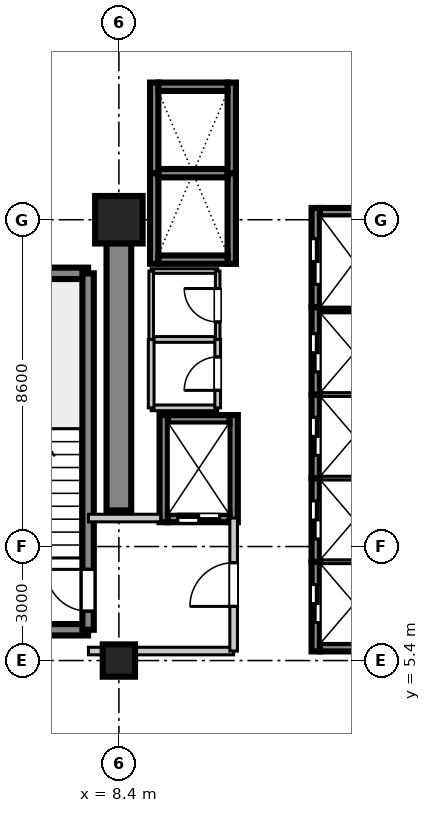
"""IFC4 building model, lengths in metres.
Left out: names, types, materials, properties, quantities, classifications, styles, units other than length and angle.
Written with IfcOpenShell. Run it as: python <this file> out.ifc"""

import sys

from ifc_helpers import new_model, si_unit, direction, frame, frame_2d, origin, origin_2d, place, context, subcontext, project, spatial, rectangle, extrude, source, transform, mapped, element, fill, save


model = new_model("IFC4")
c1 = context("Model", 3, precision=1e-05, world=origin(), true_north=direction((0.0, 1.0)))
c2 = subcontext(c1, "Body", "Model", "MODEL_VIEW")
j1 = project(units=[si_unit("LENGTHUNIT", "METRE"), si_unit("PLANEANGLEUNIT", "RADIAN")], contexts=[c1])
p1 = place(None, origin())
s1 = spatial("IfcSite", under=j1, at=p1, CompositionType="ELEMENT")
p2 = place(p1, origin())
s2 = spatial("IfcBuilding", under=s1, at=p2, CompositionType="ELEMENT")
p3 = place(p2, frame((0.0, 0.0, 95.6)))
s3 = spatial("IfcBuildingStorey", under=s2, at=p3, CompositionType="ELEMENT", Elevation=95.6)
m1 = source(origin(), c2, "Body", "SweptSolid", [
    extrude(rectangle(XDim=0.85, YDim=0.85, at=origin_2d()), origin(), (0.0, 0.0, 1.0), 3.605),
])
p4 = place(p3, frame((8.4, 5.4, 0.0), z_axis=(0.0, 0.0, 1.0), x_axis=(1.0, 0.0, 0.0)))
e1 = element("IfcColumn", 1, at=p4, inside=s3, PredefinedType="PILASTER", context=c2, shape_type="MappedRepresentation", body=[
    mapped(m1, transform((0.0, 0.0, 0.0), scale=1.0)),
])
m2 = source(origin(), c2, "Body", "SweptSolid", [
    extrude(rectangle(XDim=1.25, YDim=1.25, at=origin_2d()), origin(), (0.0, 0.0, 1.0), 3.605),
])
p5 = place(p3, frame((8.4, 17.0, 0.0), z_axis=(0.0, 0.0, 1.0), x_axis=(1.0, 0.0, 0.0)))
e2 = element("IfcColumn", 2, at=p5, inside=s3, PredefinedType="COLUMN", context=c2, shape_type="MappedRepresentation", body=[
    mapped(m2, transform((0.0, 0.0, 0.0), scale=1.0)),
])
m3 = source(origin(), c2, "Body", "SweptSolid", [
    extrude(rectangle(XDim=7.65, YDim=0.65, at=frame_2d((3.825, 0.0))), origin(), (0.0, 0.0, 1.0), 3.38),
])
p6 = place(p3, frame((8.4, 9.35, 0.0), z_axis=(0.0, 0.0, 1.0), x_axis=(0.0, 1.0, 0.0)))
e3 = element("IfcWall", 3, at=p6, inside=s3, PredefinedType="SHEAR", context=c2, shape_type="MappedRepresentation", body=[
    mapped(m3, transform((0.0, 0.0, 0.0), scale=1.0)),
])
m4 = source(origin(), c2, "Body", "SweptSolid", [
    extrude(rectangle(XDim=3.98, YDim=0.3, at=frame_2d((1.99, 0.0))), origin(), (0.0, 0.0, 1.0), 3.38),
])
for number, where, z_axis, x_axis in (
    (4, (3.61, 6.21, 0.0), (0.0, 0.0, 1.0), (1.0, 0.0, 0.0)),
    (5, (3.61, 15.59, 0.0), (0.0, 0.0, 1.0), (1.0, 0.0, 0.0)),
):
    element("IfcWall", number, at=place(p3, frame(where, z_axis=z_axis, x_axis=x_axis)), inside=s3, PredefinedType="SHEAR", context=c2, shape_type="MappedRepresentation", body=[
        mapped(m4, transform((0.0, 0.0, 0.0), scale=1.0)),
    ])
m5 = source(origin(), c2, "Body", "SweptSolid", [
    extrude(rectangle(XDim=9.38, YDim=0.3, at=frame_2d((4.69, 0.0))), origin(), (0.0, 0.0, 1.0), 3.38),
])
p7 = place(p3, frame((7.59, 6.21, 0.0), z_axis=(0.0, 0.0, 1.0), x_axis=(0.0, 1.0, 0.0)))
e6 = element("IfcWall", 6, at=p7, inside=s3, PredefinedType="SHEAR", context=c2, shape_type="MappedRepresentation", body=[
    mapped(m5, transform((0.0, 0.0, 0.0), scale=1.0)),
])
p8 = place(p7, frame((0.49, 0.0, 0.0)))
e7 = element("IfcOpeningElement", 7, at=p8, cuts=e6, PredefinedType="OPENING", context=c2, shape_type="SweptSolid", body=[
    extrude(rectangle(XDim=1.1, YDim=2.15, at=frame_2d((0.55, 1.075))), frame((0.0, 0.16, 0.0), z_axis=(0.0, -1.0, 0.0), x_axis=(1.0, 0.0, 0.0)), (0.0, 0.0, 1.0), 0.32),
])
m6 = source(origin(), c2, "Body", "SweptSolid", [
    extrude(rectangle(XDim=2.36, YDim=0.22, at=frame_2d((1.18, 0.0))), origin(), (0.0, 0.0, 1.0), 3.38),
])
p9 = place(p3, frame((13.58, 5.64, 0.0), z_axis=(0.0, 0.0, 1.0), x_axis=(0.0, 1.0, 0.0)))
e8 = element("IfcWall", 8, at=p9, inside=s3, PredefinedType="SHEAR", context=c2, shape_type="MappedRepresentation", body=[
    mapped(m6, transform((0.0, 0.0, 0.0), scale=1.0)),
])
p10 = place(p9, frame((0.76, 0.0, 0.0)))
e9 = element("IfcOpeningElement", 9, at=p10, cuts=e8, PredefinedType="OPENING", context=c2, shape_type="SweptSolid", body=[
    extrude(rectangle(XDim=1.0, YDim=2.2, at=frame_2d((0.5, 1.1))), frame((0.0, 0.12, 0.0), z_axis=(0.0, -1.0, 0.0), x_axis=(1.0, 0.0, 0.0)), (0.0, 0.0, 1.0), 0.24),
])
m7 = source(origin(), c2, "Body", "SweptSolid", [
    extrude(rectangle(XDim=1.82, YDim=0.22, at=frame_2d((0.91, 0.0))), origin(), (0.0, 0.0, 1.0), 3.38),
])
p11 = place(p3, frame((13.69, 5.75, 0.0), z_axis=(0.0, 0.0, 1.0), x_axis=(1.0, 0.0, 0.0)))
e10 = element("IfcWall", 10, at=p11, inside=s3, PredefinedType="SHEAR", context=c2, shape_type="MappedRepresentation", body=[
    mapped(m7, transform((0.0, 0.0, 0.0), scale=1.0)),
])
m8 = source(origin(), c2, "Body", "SweptSolid", [
    extrude(rectangle(XDim=1.82, YDim=0.22, at=frame_2d((0.91, 0.0))), origin(), (0.0, 0.0, 1.0), 3.65),
])
p12 = place(p3, frame((13.69, 8.0, 0.0), z_axis=(0.0, 0.0, 1.0), x_axis=(1.0, 0.0, 0.0)))
e11 = element("IfcWall", 11, at=p12, inside=s3, PredefinedType="SHEAR", context=c2, shape_type="MappedRepresentation", body=[
    mapped(m8, transform((0.0, 0.0, 0.0), scale=1.0)),
])
m9 = source(origin(), c2, "Body", "SweptSolid", [
    extrude(rectangle(XDim=2.2, YDim=0.22, at=frame_2d((1.1, 0.0))), origin(), (0.0, 0.0, 1.0), 3.38),
])
p13 = place(p3, frame((13.58, 8.0, 0.0), z_axis=(0.0, 0.0, 1.0), x_axis=(0.0, 1.0, 0.0)))
e12 = element("IfcWall", 12, at=p13, inside=s3, PredefinedType="SHEAR", context=c2, shape_type="MappedRepresentation", body=[
    mapped(m9, transform((0.0, 0.0, 0.0), scale=1.0)),
])
p14 = place(p13, frame((0.6, 0.0, 0.0)))
e13 = element("IfcOpeningElement", 13, at=p14, cuts=e12, PredefinedType="OPENING", context=c2, shape_type="SweptSolid", body=[
    extrude(rectangle(XDim=1.0, YDim=2.2, at=frame_2d((0.5, 1.1))), frame((0.0, 0.12, 0.0), z_axis=(0.0, -1.0, 0.0), x_axis=(1.0, 0.0, 0.0)), (0.0, 0.0, 1.0), 0.24),
])
p15 = place(p3, frame((13.69, 10.2, 0.0), z_axis=(0.0, 0.0, 1.0), x_axis=(1.0, 0.0, 0.0)))
e14 = element("IfcWall", 14, at=p15, inside=s3, PredefinedType="SHEAR", context=c2, shape_type="MappedRepresentation", body=[
    mapped(m8, transform((0.0, 0.0, 0.0), scale=1.0)),
])
p16 = place(p3, frame((13.58, 10.2, 0.0), z_axis=(0.0, 0.0, 1.0), x_axis=(0.0, 1.0, 0.0)))
e15 = element("IfcWall", 15, at=p16, inside=s3, PredefinedType="SHEAR", context=c2, shape_type="MappedRepresentation", body=[
    mapped(m9, transform((0.0, 0.0, 0.0), scale=1.0)),
])
p17 = place(p16, frame((0.6, 0.0, 0.0)))
e16 = element("IfcOpeningElement", 16, at=p17, cuts=e15, PredefinedType="OPENING", context=c2, shape_type="SweptSolid", body=[
    extrude(rectangle(XDim=1.0, YDim=2.2, at=frame_2d((0.5, 1.1))), frame((0.0, 0.12, 0.0), z_axis=(0.0, -1.0, 0.0), x_axis=(1.0, 0.0, 0.0)), (0.0, 0.0, 1.0), 0.24),
])
p18 = place(p3, frame((13.69, 12.4, 0.0), z_axis=(0.0, 0.0, 1.0), x_axis=(1.0, 0.0, 0.0)))
e17 = element("IfcWall", 17, at=p18, inside=s3, PredefinedType="SHEAR", context=c2, shape_type="MappedRepresentation", body=[
    mapped(m8, transform((0.0, 0.0, 0.0), scale=1.0)),
])
m10 = source(origin(), c2, "Body", "SweptSolid", [
    extrude(rectangle(XDim=2.3, YDim=0.22, at=frame_2d((1.15, 0.0))), origin(), (0.0, 0.0, 1.0), 3.38),
])
p19 = place(p3, frame((13.58, 12.4, 0.0), z_axis=(0.0, 0.0, 1.0), x_axis=(0.0, 1.0, 0.0)))
e18 = element("IfcWall", 18, at=p19, inside=s3, PredefinedType="SHEAR", context=c2, shape_type="MappedRepresentation", body=[
    mapped(m10, transform((0.0, 0.0, 0.0), scale=1.0)),
])
p20 = place(p19, frame((0.6, 0.0, 0.0)))
e19 = element("IfcOpeningElement", 19, at=p20, cuts=e18, PredefinedType="OPENING", context=c2, shape_type="SweptSolid", body=[
    extrude(rectangle(XDim=1.0, YDim=2.2, at=frame_2d((0.5, 1.1))), frame((0.0, 0.12, 0.0), z_axis=(0.0, -1.0, 0.0), x_axis=(1.0, 0.0, 0.0)), (0.0, 0.0, 1.0), 0.24),
])
p21 = place(p3, frame((13.69, 14.7, 0.0), z_axis=(0.0, 0.0, 1.0), x_axis=(1.0, 0.0, 0.0)))
e20 = element("IfcWall", 20, at=p21, inside=s3, PredefinedType="SHEAR", context=c2, shape_type="MappedRepresentation", body=[
    mapped(m8, transform((0.0, 0.0, 0.0), scale=1.0)),
])
m11 = source(origin(), c2, "Body", "SweptSolid", [
    extrude(rectangle(XDim=2.385, YDim=0.22, at=frame_2d((1.192, 0.0))), origin(), (0.0, 0.0, 1.0), 3.38),
])
for number, where, z_axis, x_axis in (
    (21, (9.33, 15.84, 0.0), (0.0, 0.0, 1.0), (0.0, 1.0, 0.0)),
    (22, (11.37, 15.84, 0.0), (0.0, 0.0, 1.0), (0.0, 1.0, 0.0)),
):
    element("IfcWall", number, at=place(p3, frame(where, z_axis=z_axis, x_axis=x_axis)), inside=s3, PredefinedType="SHEAR", context=c2, shape_type="MappedRepresentation", body=[
        mapped(m11, transform((0.0, 0.0, 0.0), scale=1.0)),
    ])
p22 = place(p3, frame((9.44, 15.95, 0.0), z_axis=(0.0, 0.0, 1.0), x_axis=(1.0, 0.0, 0.0)))
e23 = element("IfcWall", 23, at=p22, inside=s3, PredefinedType="SHEAR", context=c2, shape_type="MappedRepresentation", body=[
    mapped(m7, transform((0.0, 0.0, 0.0), scale=1.0)),
])
p23 = place(p3, frame((9.44, 18.225, 0.0), z_axis=(0.0, 0.0, 1.0), x_axis=(1.0, 0.0, 0.0)))
e24 = element("IfcWall", 24, at=p23, inside=s3, PredefinedType="SHEAR", context=c2, shape_type="MappedRepresentation", body=[
    mapped(m8, transform((0.0, 0.0, 0.0), scale=1.0)),
])
for number, where, z_axis, x_axis in (
    (25, (9.33, 18.225, 0.0), (0.0, 0.0, 1.0), (0.0, 1.0, 0.0)),
    (26, (11.37, 18.225, 0.0), (0.0, 0.0, 1.0), (0.0, 1.0, 0.0)),
):
    element("IfcWall", number, at=place(p3, frame(where, z_axis=z_axis, x_axis=x_axis)), inside=s3, PredefinedType="SHEAR", context=c2, shape_type="MappedRepresentation", body=[
        mapped(m11, transform((0.0, 0.0, 0.0), scale=1.0)),
    ])
p24 = place(p3, frame((9.44, 20.5, 0.0), z_axis=(0.0, 0.0, 1.0), x_axis=(1.0, 0.0, 0.0)))
e27 = element("IfcWall", 27, at=p24, inside=s3, PredefinedType="SHEAR", context=c2, shape_type="MappedRepresentation", body=[
    mapped(m7, transform((0.0, 0.0, 0.0), scale=1.0)),
])
m12 = source(origin(), c2, "Body", "SweptSolid", [
    extrude(rectangle(XDim=2.82, YDim=0.22, at=frame_2d((1.41, 0.0))), origin(), (0.0, 0.0, 1.0), 3.38),
])
for number, where, z_axis, x_axis in (
    (28, (9.58, 9.04, 0.0), (0.0, 0.0, 1.0), (0.0, 1.0, 0.0)),
    (29, (11.42, 9.04, 0.0), (0.0, 0.0, 1.0), (0.0, 1.0, 0.0)),
):
    element("IfcWall", number, at=place(p3, frame(where, z_axis=z_axis, x_axis=x_axis)), inside=s3, PredefinedType="SHEAR", context=c2, shape_type="MappedRepresentation", body=[
        mapped(m12, transform((0.0, 0.0, 0.0), scale=1.0)),
    ])
m13 = source(origin(), c2, "Body", "SweptSolid", [
    extrude(rectangle(XDim=1.62, YDim=0.22, at=frame_2d((0.81, 0.0))), origin(), (0.0, 0.0, 1.0), 3.38),
])
p25 = place(p3, frame((9.69, 9.15, 0.0), z_axis=(0.0, 0.0, 1.0), x_axis=(1.0, 0.0, 0.0)))
e30 = element("IfcWall", 30, at=p25, inside=s3, PredefinedType="SHEAR", context=c2, shape_type="MappedRepresentation", body=[
    mapped(m13, transform((0.0, 0.0, 0.0), scale=1.0)),
])
p26 = place(p25, frame((0.26, 0.0, 0.0)))
e31 = element("IfcOpeningElement", 31, at=p26, cuts=e30, PredefinedType="OPENING", context=c2, shape_type="SweptSolid", body=[
    extrude(rectangle(XDim=1.1, YDim=2.2, at=frame_2d((0.55, 1.1))), frame((0.0, 0.12, 0.0), z_axis=(0.0, -1.0, 0.0), x_axis=(1.0, 0.0, 0.0)), (0.0, 0.0, 1.0), 0.24),
])
p27 = place(p3, frame((9.69, 11.75, 0.0), z_axis=(0.0, 0.0, 1.0), x_axis=(1.0, 0.0, 0.0)))
e32 = element("IfcWall", 32, at=p27, inside=s3, PredefinedType="SHEAR", context=c2, shape_type="MappedRepresentation", body=[
    mapped(m13, transform((0.0, 0.0, 0.0), scale=1.0)),
])
m14 = source(origin(), c2, "Body", "SweptSolid", [
    extrude(rectangle(XDim=2.61, YDim=0.22, at=frame_2d((1.305, 0.0))), origin(), (0.0, 0.0, 1.0), 3.38),
])
p28 = place(p3, frame((13.58, 14.7, 0.0), z_axis=(0.0, 0.0, 1.0), x_axis=(0.0, 1.0, 0.0)))
e33 = element("IfcWall", 33, at=p28, inside=s3, PredefinedType="SHEAR", context=c2, shape_type="MappedRepresentation", body=[
    mapped(m14, transform((0.0, 0.0, 0.0), scale=1.0)),
])
p29 = place(p28, frame((0.6, 0.0, 0.0)))
e34 = element("IfcOpeningElement", 34, at=p29, cuts=e33, PredefinedType="OPENING", context=c2, shape_type="SweptSolid", body=[
    extrude(rectangle(XDim=1.2, YDim=2.2, at=frame_2d((0.6, 1.1))), frame((0.0, 0.12, 0.0), z_axis=(0.0, -1.0, 0.0), x_axis=(1.0, 0.0, 0.0)), (0.0, 0.0, 1.0), 0.24),
])
p30 = place(p3, frame((13.69, 17.2, 0.0), z_axis=(0.0, 0.0, 1.0), x_axis=(1.0, 0.0, 0.0)))
e35 = element("IfcWall", 35, at=p30, inside=s3, PredefinedType="SHEAR", context=c2, shape_type="MappedRepresentation", body=[
    mapped(m7, transform((0.0, 0.0, 0.0), scale=1.0)),
])
m15 = source(origin(), c2, "Body", "SweptSolid", [
    extrude(rectangle(XDim=3.82, YDim=0.2, at=frame_2d((1.91, 0.0))), origin(), (0.0, 0.0, 1.0), 2.72),
])
p31 = place(p3, frame((7.6, 5.65, 0.0), z_axis=(0.0, 0.0, 1.0), x_axis=(1.0, 0.0, 0.0)))
e36 = element("IfcWall", 36, at=p31, inside=s3, PredefinedType="PARTITIONING", context=c2, shape_type="MappedRepresentation", body=[
    mapped(m15, transform((0.0, 0.0, 0.0), scale=1.0)),
])
m16 = source(origin(), c2, "Body", "SweptSolid", [
    extrude(rectangle(XDim=1.9, YDim=0.2, at=frame_2d((0.95, 0.0))), origin(), (0.0, 0.0, 1.0), 2.72),
])
p32 = place(p3, frame((7.6, 9.15, 0.0), z_axis=(0.0, 0.0, 1.0), x_axis=(1.0, 0.0, 0.0)))
e37 = element("IfcWall", 37, at=p32, inside=s3, PredefinedType="PARTITIONING", context=c2, shape_type="MappedRepresentation", body=[
    mapped(m16, transform((0.0, 0.0, 0.0), scale=1.0)),
])
m17 = source(origin(), c2, "Body", "SweptSolid", [
    extrude(rectangle(XDim=3.5, YDim=0.2, at=frame_2d((1.75, 0.0))), origin(), (0.0, 0.0, 1.0), 2.72),
])
p33 = place(p3, frame((11.42, 5.65, 0.0), z_axis=(0.0, 0.0, 1.0), x_axis=(0.0, 1.0, 0.0)))
e38 = element("IfcWall", 38, at=p33, inside=s3, PredefinedType="PARTITIONING", context=c2, shape_type="MappedRepresentation", body=[
    mapped(m17, transform((0.0, 0.0, 0.0), scale=1.0)),
])
p34 = place(p33, frame((1.175, 0.0, 0.0)))
e39 = element("IfcOpeningElement", 39, at=p34, cuts=e38, PredefinedType="OPENING", context=c2, shape_type="SweptSolid", body=[
    extrude(rectangle(XDim=1.15, YDim=2.15, at=frame_2d((0.575, 1.075))), frame((0.0, 0.11, 0.0), z_axis=(0.0, -1.0, 0.0), x_axis=(1.0, 0.0, 0.0)), (0.0, 0.0, 1.0), 0.22),
])
m18 = source(origin(), c2, "Body", "SweptSolid", [
    extrude(rectangle(XDim=1.75, YDim=0.15, at=frame_2d((0.875, 0.0))), origin(), (0.0, 0.0, 1.0), 2.72),
])
for number, where, z_axis, x_axis in (
    (40, (9.25, 12.05, 0.0), (0.0, 0.0, 1.0), (1.0, 0.0, 0.0)),
    (41, (9.25, 13.85, 0.0), (0.0, 0.0, 1.0), (1.0, 0.0, 0.0)),
):
    element("IfcWall", number, at=place(p3, frame(where, z_axis=z_axis, x_axis=x_axis)), inside=s3, PredefinedType="PARTITIONING", context=c2, shape_type="MappedRepresentation", body=[
        mapped(m18, transform((0.0, 0.0, 0.0), scale=1.0)),
    ])
m19 = source(origin(), c2, "Body", "SweptSolid", [
    extrude(rectangle(XDim=1.8, YDim=0.15, at=frame_2d((0.9, 0.0))), origin(), (0.0, 0.0, 1.0), 2.72),
])
p35 = place(p3, frame((9.25, 12.05, 0.0), z_axis=(0.0, 0.0, 1.0), x_axis=(0.0, 1.0, 0.0)))
e42 = element("IfcWall", 42, at=p35, inside=s3, PredefinedType="PARTITIONING", context=c2, shape_type="MappedRepresentation", body=[
    mapped(m19, transform((0.0, 0.0, 0.0), scale=1.0)),
])
p36 = place(p3, frame((11.0, 12.05, 0.0), z_axis=(0.0, 0.0, 1.0), x_axis=(0.0, 1.0, 0.0)))
e43 = element("IfcWall", 43, at=p36, inside=s3, PredefinedType="PARTITIONING", context=c2, shape_type="MappedRepresentation", body=[
    mapped(m19, transform((0.0, 0.0, 0.0), scale=1.0)),
])
p37 = place(p36, frame((0.46, 0.0, 0.0)))
e44 = element("IfcOpeningElement", 44, at=p37, cuts=e43, PredefinedType="OPENING", context=c2, shape_type="SweptSolid", body=[
    extrude(rectangle(XDim=0.88, YDim=2.1, at=frame_2d((0.44, 1.05))), frame((0.0, 0.085, 0.0), z_axis=(0.0, -1.0, 0.0), x_axis=(1.0, 0.0, 0.0)), (0.0, 0.0, 1.0), 0.17),
])
m20 = source(origin(), c2, "Body", "SweptSolid", [
    extrude(rectangle(XDim=1.75, YDim=0.12, at=frame_2d((0.875, 0.0))), origin(), (0.0, 0.0, 1.0), 2.72),
])
p38 = place(p3, frame((9.25, 15.65, 0.0), z_axis=(0.0, 0.0, 1.0), x_axis=(1.0, 0.0, 0.0)))
e45 = element("IfcWall", 45, at=p38, inside=s3, PredefinedType="PARTITIONING", context=c2, shape_type="MappedRepresentation", body=[
    mapped(m20, transform((0.0, 0.0, 0.0), scale=1.0)),
])
m21 = source(origin(), c2, "Body", "SweptSolid", [
    extrude(rectangle(XDim=1.8, YDim=0.12, at=frame_2d((0.9, 0.0))), origin(), (0.0, 0.0, 1.0), 2.72),
])
p39 = place(p3, frame((9.25, 13.85, 0.0), z_axis=(0.0, 0.0, 1.0), x_axis=(0.0, 1.0, 0.0)))
e46 = element("IfcWall", 46, at=p39, inside=s3, PredefinedType="PARTITIONING", context=c2, shape_type="MappedRepresentation", body=[
    mapped(m21, transform((0.0, 0.0, 0.0), scale=1.0)),
])
p40 = place(p3, frame((11.0, 13.85, 0.0), z_axis=(0.0, 0.0, 1.0), x_axis=(0.0, 1.0, 0.0)))
e47 = element("IfcWall", 47, at=p40, inside=s3, PredefinedType="PARTITIONING", context=c2, shape_type="MappedRepresentation", body=[
    mapped(m21, transform((0.0, 0.0, 0.0), scale=1.0)),
])
p41 = place(p40, frame((0.46, 0.0, 0.0)))
e48 = element("IfcOpeningElement", 48, at=p41, cuts=e47, PredefinedType="OPENING", context=c2, shape_type="SweptSolid", body=[
    extrude(rectangle(XDim=0.88, YDim=2.1, at=frame_2d((0.44, 1.05))), frame((0.0, 0.07, 0.0), z_axis=(0.0, -1.0, 0.0), x_axis=(1.0, 0.0, 0.0)), (0.0, 0.0, 1.0), 0.14),
])
m22 = source(origin(), c2, "Body", "SweptSolid", [
    extrude(rectangle(XDim=1.1, YDim=2.15, at=frame_2d((0.55, 1.075))), frame((0.0, 0.025, 0.0), z_axis=(0.0, -1.0, 0.0), x_axis=(1.0, 0.0, 0.0)), (0.0, 0.0, 1.0), 0.05),
])
p42 = place(p8, origin())
e49 = element("IfcDoor", 49, at=p42, inside=s3, OperationType="SINGLE_SWING_RIGHT", PredefinedType="DOOR", context=c2, shape_type="MappedRepresentation", body=[
    mapped(m22, transform((0.0, 0.0, 0.0), scale=1.0)),
])
fill(e7, e49)
m23 = source(origin(), c2, "Body", "SweptSolid", [
    extrude(rectangle(XDim=1.0, YDim=2.2, at=frame_2d((0.5, 1.1))), frame((0.0, 0.025, 0.0), z_axis=(0.0, -1.0, 0.0), x_axis=(1.0, 0.0, 0.0)), (0.0, 0.0, 1.0), 0.05),
])
p43 = place(p10, origin())
e50 = element("IfcDoor", 50, at=p43, inside=s3, OperationType="DOUBLE_DOOR_SLIDING", PredefinedType="DOOR", context=c2, shape_type="MappedRepresentation", body=[
    mapped(m23, transform((0.0, 0.0, 0.0), scale=1.0)),
])
fill(e9, e50)
p44 = place(p14, origin())
e51 = element("IfcDoor", 51, at=p44, inside=s3, OperationType="DOUBLE_DOOR_SLIDING", PredefinedType="DOOR", context=c2, shape_type="MappedRepresentation", body=[
    mapped(m23, transform((0.0, 0.0, 0.0), scale=1.0)),
])
fill(e13, e51)
p45 = place(p17, origin())
e52 = element("IfcDoor", 52, at=p45, inside=s3, OperationType="DOUBLE_DOOR_SLIDING", PredefinedType="DOOR", context=c2, shape_type="MappedRepresentation", body=[
    mapped(m23, transform((0.0, 0.0, 0.0), scale=1.0)),
])
fill(e16, e52)
p46 = place(p20, origin())
e53 = element("IfcDoor", 53, at=p46, inside=s3, OperationType="DOUBLE_DOOR_SLIDING", PredefinedType="DOOR", context=c2, shape_type="MappedRepresentation", body=[
    mapped(m23, transform((0.0, 0.0, 0.0), scale=1.0)),
])
fill(e19, e53)
m24 = source(origin(), c2, "Body", "SweptSolid", [
    extrude(rectangle(XDim=1.1, YDim=2.2, at=frame_2d((0.55, 1.1))), frame((0.0, 0.025, 0.0), z_axis=(0.0, -1.0, 0.0), x_axis=(1.0, 0.0, 0.0)), (0.0, 0.0, 1.0), 0.05),
])
p47 = place(p26, frame((1.1, 0.0, 0.0), z_axis=(0.0, 0.0, 1.0), x_axis=(-1.0, 0.0, 0.0)))
e54 = element("IfcDoor", 54, at=p47, inside=s3, OperationType="DOUBLE_DOOR_SLIDING", PredefinedType="DOOR", context=c2, shape_type="MappedRepresentation", body=[
    mapped(m24, transform((0.0, 0.0, 0.0), scale=1.0)),
])
fill(e31, e54)
m25 = source(origin(), c2, "Body", "SweptSolid", [
    extrude(rectangle(XDim=1.2, YDim=2.2, at=frame_2d((0.6, 1.1))), frame((0.0, 0.025, 0.0), z_axis=(0.0, -1.0, 0.0), x_axis=(1.0, 0.0, 0.0)), (0.0, 0.0, 1.0), 0.05),
])
p48 = place(p29, origin())
e55 = element("IfcDoor", 55, at=p48, inside=s3, OperationType="DOUBLE_DOOR_SLIDING", PredefinedType="DOOR", context=c2, shape_type="MappedRepresentation", body=[
    mapped(m25, transform((0.0, 0.0, 0.0), scale=1.0)),
])
fill(e34, e55)
m26 = source(origin(), c2, "Body", "SweptSolid", [
    extrude(rectangle(XDim=1.15, YDim=2.15, at=frame_2d((0.575, 1.075))), frame((0.0, 0.025, 0.0), z_axis=(0.0, -1.0, 0.0), x_axis=(1.0, 0.0, 0.0)), (0.0, 0.0, 1.0), 0.05),
])
p49 = place(p34, frame((1.15, 0.0, 0.0), z_axis=(0.0, 0.0, 1.0), x_axis=(-1.0, 0.0, 0.0)))
e56 = element("IfcDoor", 56, at=p49, inside=s3, OperationType="SINGLE_SWING_LEFT", PredefinedType="DOOR", context=c2, shape_type="MappedRepresentation", body=[
    mapped(m26, transform((0.0, 0.0, 0.0), scale=1.0)),
])
fill(e39, e56)
m27 = source(origin(), c2, "Body", "SweptSolid", [
    extrude(rectangle(XDim=0.88, YDim=2.1, at=frame_2d((0.44, 1.05))), frame((0.0, 0.025, 0.0), z_axis=(0.0, -1.0, 0.0), x_axis=(1.0, 0.0, 0.0)), (0.0, 0.0, 1.0), 0.05),
])
p50 = place(p37, origin())
e57 = element("IfcDoor", 57, at=p50, inside=s3, OperationType="SINGLE_SWING_LEFT", PredefinedType="DOOR", context=c2, shape_type="MappedRepresentation", body=[
    mapped(m27, transform((0.0, 0.0, 0.0), scale=1.0)),
])
fill(e44, e57)
p51 = place(p41, origin())
e58 = element("IfcDoor", 58, at=p51, inside=s3, OperationType="SINGLE_SWING_RIGHT", PredefinedType="DOOR", context=c2, shape_type="MappedRepresentation", body=[
    mapped(m27, transform((0.0, 0.0, 0.0), scale=1.0)),
])
fill(e48, e58)
save(model, sys.argv[1])
